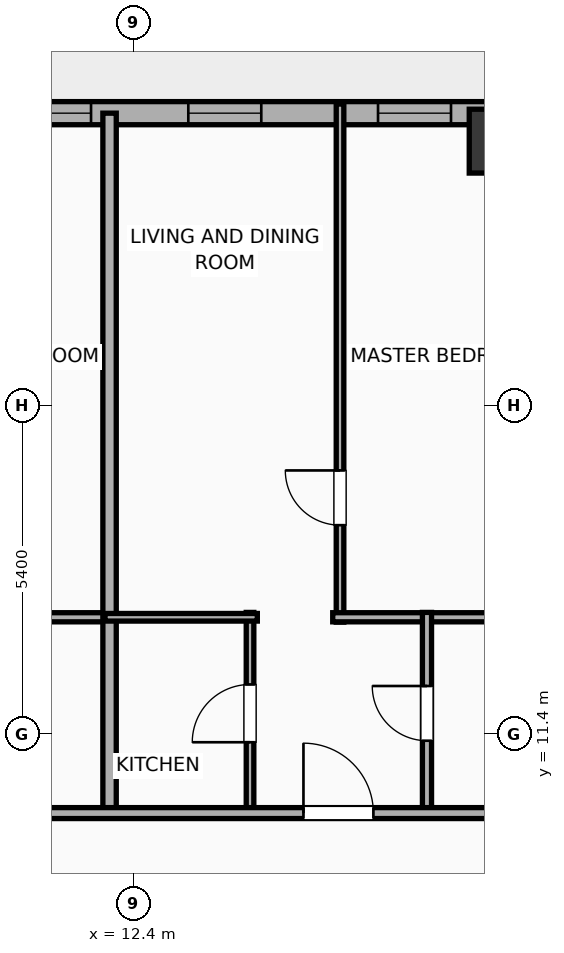
"""IFC4 building model, lengths in metres.
Left out: names, types, materials, properties, quantities, classifications, styles, units other than length and angle.
Written with IfcOpenShell. Run it as: python <this file> out.ifc"""

import sys

from ifc_helpers import new_model, si_unit, direction, frame, frame_2d, origin, origin_2d, place, context, subcontext, project, spatial, rectangle, hollow_rectangle, extrude, element, fill, save


model = new_model("IFC4")
c1 = context("Model", 3, precision=1e-05, world=origin(), true_north=direction((0.0, 1.0)))
c2 = subcontext(c1, "Body", "Model", "MODEL_VIEW")
j1 = project(units=[si_unit("LENGTHUNIT", "METRE"), si_unit("PLANEANGLEUNIT", "RADIAN")], contexts=[c1])
p1 = place(None, origin())
s1 = spatial("IfcSite", under=j1, at=p1, CompositionType="ELEMENT")
p2 = place(p1, origin())
s2 = spatial("IfcBuilding", under=s1, at=p2, CompositionType="ELEMENT")
p3 = place(p2, frame((0.0, 0.0, 113.1)))
s3 = spatial("IfcBuildingStorey", under=s2, at=p3, CompositionType="ELEMENT", Elevation=113.1)
p4 = place(p3, frame((18.44, 21.15, 0.0), z_axis=(0.0, 0.0, 1.0), x_axis=(1.0, 0.0, 0.0)))
e1 = element("IfcColumn", 1, at=p4, inside=s3, PredefinedType="COLUMN", context=c2, shape_type="SweptSolid", body=[
    extrude(hollow_rectangle(XDim=1.05, YDim=1.05, WallThickness=0.036, at=origin_2d()), origin(), (0.0, 0.0, 1.0), 3.9),
])
p5 = place(p3, frame((-25.381, 21.61, 0.0), z_axis=(0.0, 0.0, 1.0), x_axis=(1.0, 0.0, 0.0)))
e2 = element("IfcWall", 2, at=p5, inside=s3, PredefinedType="ELEMENTEDWALL", context=c2, shape_type="SweptSolid", body=[
    extrude(rectangle(XDim=54.763, YDim=0.38, at=frame_2d((27.381, 0.0))), origin(), (0.0, 0.0, 1.0), 3.65),
])
p6 = place(p5, frame((5.645, 0.0, 0.75)))
e3 = element("IfcOpeningElement", 3, at=p6, cuts=e2, PredefinedType="OPENING", context=c2, shape_type="SweptSolid", body=[
    extrude(rectangle(XDim=2.4, YDim=2.1, at=frame_2d((1.2, 1.05))), frame((0.0, 0.2, 0.0), z_axis=(0.0, -1.0, 0.0), x_axis=(1.0, 0.0, 0.0)), (0.0, 0.0, 1.0), 0.4),
])
p7 = place(p5, frame((34.677, 0.0, 0.75)))
e4 = element("IfcOpeningElement", 4, at=p7, cuts=e2, PredefinedType="OPENING", context=c2, shape_type="SweptSolid", body=[
    extrude(rectangle(XDim=2.4, YDim=2.1, at=frame_2d((1.2, 1.05))), frame((0.0, 0.2, 0.0), z_axis=(0.0, -1.0, 0.0), x_axis=(1.0, 0.0, 0.0)), (0.0, 0.0, 1.0), 0.4),
])
p8 = place(p5, frame((45.067, 0.0, 0.75)))
e5 = element("IfcOpeningElement", 5, at=p8, cuts=e2, PredefinedType="OPENING", context=c2, shape_type="SweptSolid", body=[
    extrude(rectangle(XDim=2.4, YDim=2.1, at=frame_2d((1.2, 1.05))), frame((0.0, 0.2, 0.0), z_axis=(0.0, -1.0, 0.0), x_axis=(1.0, 0.0, 0.0)), (0.0, 0.0, 1.0), 0.4),
])
p9 = place(p5, frame((2.938, 0.0, 0.75)))
e6 = element("IfcOpeningElement", 6, at=p9, cuts=e2, PredefinedType="OPENING", context=c2, shape_type="SweptSolid", body=[
    extrude(rectangle(XDim=1.2, YDim=2.05, at=frame_2d((0.6, 1.025))), frame((0.0, 0.2, 0.0), z_axis=(0.0, -1.0, 0.0), x_axis=(1.0, 0.0, 0.0)), (0.0, 0.0, 1.0), 0.4),
])
p10 = place(p5, frame((8.916, 0.0, 0.75)))
e7 = element("IfcOpeningElement", 7, at=p10, cuts=e2, PredefinedType="OPENING", context=c2, shape_type="SweptSolid", body=[
    extrude(rectangle(XDim=1.2, YDim=2.05, at=frame_2d((0.6, 1.025))), frame((0.0, 0.2, 0.0), z_axis=(0.0, -1.0, 0.0), x_axis=(1.0, 0.0, 0.0)), (0.0, 0.0, 1.0), 0.4),
])
p11 = place(p5, frame((13.476, 0.0, 0.75)))
e8 = element("IfcOpeningElement", 8, at=p11, cuts=e2, PredefinedType="OPENING", context=c2, shape_type="SweptSolid", body=[
    extrude(rectangle(XDim=1.2, YDim=2.05, at=frame_2d((0.6, 1.025))), frame((0.0, 0.2, 0.0), z_axis=(0.0, -1.0, 0.0), x_axis=(1.0, 0.0, 0.0)), (0.0, 0.0, 1.0), 0.4),
])
p12 = place(p5, frame((17.076, 0.0, 0.75)))
e9 = element("IfcOpeningElement", 9, at=p12, cuts=e2, PredefinedType="OPENING", context=c2, shape_type="SweptSolid", body=[
    extrude(rectangle(XDim=1.2, YDim=2.05, at=frame_2d((0.6, 1.025))), frame((0.0, 0.2, 0.0), z_axis=(0.0, -1.0, 0.0), x_axis=(1.0, 0.0, 0.0)), (0.0, 0.0, 1.0), 0.4),
])
p13 = place(p5, frame((19.956, 0.0, 0.75)))
e10 = element("IfcOpeningElement", 10, at=p13, cuts=e2, PredefinedType="OPENING", context=c2, shape_type="SweptSolid", body=[
    extrude(rectangle(XDim=1.2, YDim=2.05, at=frame_2d((0.6, 1.025))), frame((0.0, 0.2, 0.0), z_axis=(0.0, -1.0, 0.0), x_axis=(1.0, 0.0, 0.0)), (0.0, 0.0, 1.0), 0.4),
])
p14 = place(p5, frame((24.276, 0.0, 0.75)))
e11 = element("IfcOpeningElement", 11, at=p14, cuts=e2, PredefinedType="OPENING", context=c2, shape_type="SweptSolid", body=[
    extrude(rectangle(XDim=1.2, YDim=2.05, at=frame_2d((0.6, 1.025))), frame((0.0, 0.2, 0.0), z_axis=(0.0, -1.0, 0.0), x_axis=(1.0, 0.0, 0.0)), (0.0, 0.0, 1.0), 0.4),
])
p15 = place(p5, frame((27.876, 0.0, 0.75)))
e12 = element("IfcOpeningElement", 12, at=p15, cuts=e2, PredefinedType="OPENING", context=c2, shape_type="SweptSolid", body=[
    extrude(rectangle(XDim=1.2, YDim=2.05, at=frame_2d((0.6, 1.025))), frame((0.0, 0.2, 0.0), z_axis=(0.0, -1.0, 0.0), x_axis=(1.0, 0.0, 0.0)), (0.0, 0.0, 1.0), 0.4),
])
p16 = place(p5, frame((30.876, 0.0, 0.75)))
e13 = element("IfcOpeningElement", 13, at=p16, cuts=e2, PredefinedType="OPENING", context=c2, shape_type="SweptSolid", body=[
    extrude(rectangle(XDim=1.2, YDim=2.05, at=frame_2d((0.6, 1.025))), frame((0.0, 0.2, 0.0), z_axis=(0.0, -1.0, 0.0), x_axis=(1.0, 0.0, 0.0)), (0.0, 0.0, 1.0), 0.4),
])
p17 = place(p5, frame((38.676, 0.0, 0.75)))
e14 = element("IfcOpeningElement", 14, at=p17, cuts=e2, PredefinedType="OPENING", context=c2, shape_type="SweptSolid", body=[
    extrude(rectangle(XDim=1.2, YDim=2.05, at=frame_2d((0.6, 1.025))), frame((0.0, 0.2, 0.0), z_axis=(0.0, -1.0, 0.0), x_axis=(1.0, 0.0, 0.0)), (0.0, 0.0, 1.0), 0.4),
])
p18 = place(p5, frame((41.796, 0.0, 0.75)))
e15 = element("IfcOpeningElement", 15, at=p18, cuts=e2, PredefinedType="OPENING", context=c2, shape_type="SweptSolid", body=[
    extrude(rectangle(XDim=1.2, YDim=2.05, at=frame_2d((0.6, 1.025))), frame((0.0, 0.2, 0.0), z_axis=(0.0, -1.0, 0.0), x_axis=(1.0, 0.0, 0.0)), (0.0, 0.0, 1.0), 0.4),
])
p19 = place(p5, frame((49.476, 0.0, 0.75)))
e16 = element("IfcOpeningElement", 16, at=p19, cuts=e2, PredefinedType="OPENING", context=c2, shape_type="SweptSolid", body=[
    extrude(rectangle(XDim=1.2, YDim=2.05, at=frame_2d((0.6, 1.025))), frame((0.0, 0.2, 0.0), z_axis=(0.0, -1.0, 0.0), x_axis=(1.0, 0.0, 0.0)), (0.0, 0.0, 1.0), 0.4),
])
p20 = place(p5, frame((52.227, 0.0, 0.75)))
e17 = element("IfcOpeningElement", 17, at=p20, cuts=e2, PredefinedType="OPENING", context=c2, shape_type="SweptSolid", body=[
    extrude(rectangle(XDim=1.2, YDim=2.05, at=frame_2d((0.6, 1.025))), frame((0.0, 0.2, 0.0), z_axis=(0.0, -1.0, 0.0), x_axis=(1.0, 0.0, 0.0)), (0.0, 0.0, 1.0), 0.4),
])
p21 = place(p3, frame((8.47, 13.32, 0.0), z_axis=(0.0, 0.0, 1.0), x_axis=(1.0, 0.0, 0.0)))
e18 = element("IfcWall", 18, at=p21, inside=s3, PredefinedType="PLUMBINGWALL", context=c2, shape_type="SweptSolid", body=[
    extrude(rectangle(XDim=3.605, YDim=0.15, at=frame_2d((1.802, 0.0))), origin(), (0.0, 0.0, 1.0), 3.65),
])
p22 = place(p3, frame((12.0, 10.02, 0.0), z_axis=(0.0, 0.0, 1.0), x_axis=(0.0, 1.0, 0.0)))
e19 = element("IfcWall", 19, at=p22, inside=s3, PredefinedType="PARTITIONING", context=c2, shape_type="SweptSolid", body=[
    extrude(rectangle(XDim=11.59, YDim=0.22, at=frame_2d((5.795, 0.0))), origin(), (0.0, 0.0, 1.0), 3.65),
])
p23 = place(p3, frame((15.79, 13.24, 0.0), z_axis=(0.0, 0.0, 1.0), x_axis=(0.0, 1.0, 0.0)))
e20 = element("IfcWall", 20, at=p23, inside=s3, PredefinedType="PARTITIONING", context=c2, shape_type="SweptSolid", body=[
    extrude(rectangle(XDim=8.52, YDim=0.125, at=frame_2d((4.26, 0.0))), origin(), (0.0, 0.0, 1.0), 3.65),
])
p24 = place(p23, frame((1.595, 0.0, 0.0)))
e21 = element("IfcOpeningElement", 21, at=p24, cuts=e20, PredefinedType="OPENING", context=c2, shape_type="SweptSolid", body=[
    extrude(rectangle(XDim=0.9, YDim=2.05, at=frame_2d((0.45, 1.025))), frame((0.0, 0.073, 0.0), z_axis=(0.0, -1.0, 0.0), x_axis=(1.0, 0.0, 0.0)), (0.0, 0.0, 1.0), 0.145),
])
p25 = place(p3, frame((15.67, 13.32, 0.0), z_axis=(0.0, 0.0, 1.0), x_axis=(1.0, 0.0, 0.0)))
e22 = element("IfcWall", 22, at=p25, inside=s3, PredefinedType="PLUMBINGWALL", context=c2, shape_type="SweptSolid", body=[
    extrude(rectangle(XDim=3.605, YDim=0.15, at=frame_2d((1.802, 0.0))), origin(), (0.0, 0.0, 1.0), 3.65),
])
p26 = place(p3, frame((14.31, 10.08, 0.0), z_axis=(0.0, 0.0, 1.0), x_axis=(0.0, 1.0, 0.0)))
e23 = element("IfcWall", 23, at=p26, inside=s3, PredefinedType="PARTITIONING", context=c2, shape_type="SweptSolid", body=[
    extrude(rectangle(XDim=3.32, YDim=0.125, at=frame_2d((1.66, 0.0))), origin(), (0.0, 0.0, 1.0), 3.65),
])
p27 = place(p26, frame((1.185, 0.0, 0.0)))
e24 = element("IfcOpeningElement", 24, at=p27, cuts=e23, PredefinedType="OPENING", context=c2, shape_type="SweptSolid", body=[
    extrude(rectangle(XDim=0.95, YDim=2.05, at=frame_2d((0.475, 1.025))), frame((0.0, 0.073, 0.0), z_axis=(0.0, -1.0, 0.0), x_axis=(1.0, 0.0, 0.0)), (0.0, 0.0, 1.0), 0.145),
])
p28 = place(p3, frame((11.925, 13.32, 0.0), z_axis=(0.0, 0.0, 1.0), x_axis=(1.0, 0.0, 0.0)))
e25 = element("IfcWall", 25, at=p28, inside=s3, PredefinedType="PARTITIONING", context=c2, shape_type="SweptSolid", body=[
    extrude(rectangle(XDim=2.505, YDim=0.125, at=frame_2d((1.252, 0.0))), origin(), (0.0, 0.0, 1.0), 3.65),
])
p29 = place(p3, frame((17.22, 10.08, 0.0), z_axis=(0.0, 0.0, 1.0), x_axis=(0.0, 1.0, 0.0)))
e26 = element("IfcWall", 26, at=p29, inside=s3, PredefinedType="PLUMBINGWALL", context=c2, shape_type="SweptSolid", body=[
    extrude(rectangle(XDim=3.32, YDim=0.15, at=frame_2d((1.66, 0.0))), origin(), (0.0, 0.0, 1.0), 3.65),
])
p30 = place(p29, frame((1.21, 0.0, 0.0)))
e27 = element("IfcOpeningElement", 27, at=p30, cuts=e26, PredefinedType="OPENING", context=c2, shape_type="SweptSolid", body=[
    extrude(rectangle(XDim=0.9, YDim=2.05, at=frame_2d((0.45, 1.025))), frame((0.0, 0.085, 0.0), z_axis=(0.0, -1.0, 0.0), x_axis=(1.0, 0.0, 0.0)), (0.0, 0.0, 1.0), 0.17),
])
p31 = place(p3, frame((-29.21, 10.1, 0.0), z_axis=(0.0, 0.0, 1.0), x_axis=(1.0, 0.0, 0.0)))
e28 = element("IfcWall", 28, at=p31, inside=s3, PredefinedType="PARTITIONING", context=c2, shape_type="SweptSolid", body=[
    extrude(rectangle(XDim=62.42, YDim=0.18, at=frame_2d((31.21, 0.0))), origin(), (0.0, 0.0, 1.0), 3.65),
])
p32 = place(p31, frame((2.74, 0.0, 0.0)))
e29 = element("IfcOpeningElement", 29, at=p32, cuts=e28, PredefinedType="OPENING", context=c2, shape_type="SweptSolid", body=[
    extrude(rectangle(XDim=0.9, YDim=2.05, at=frame_2d((0.45, 1.025))), frame((0.0, 0.1, 0.0), z_axis=(0.0, -1.0, 0.0), x_axis=(1.0, 0.0, 0.0)), (0.0, 0.0, 1.0), 0.2),
])
p33 = place(p31, frame((9.868, 0.0, 0.0)))
e30 = element("IfcOpeningElement", 30, at=p33, cuts=e28, PredefinedType="OPENING", context=c2, shape_type="SweptSolid", body=[
    extrude(rectangle(XDim=1.15, YDim=2.05, at=frame_2d((0.575, 1.025))), frame((0.0, 0.1, 0.0), z_axis=(0.0, -1.0, 0.0), x_axis=(1.0, 0.0, 0.0)), (0.0, 0.0, 1.0), 0.2),
])
p34 = place(p31, frame((15.598, 0.0, 0.0)))
e31 = element("IfcOpeningElement", 31, at=p34, cuts=e28, PredefinedType="OPENING", context=c2, shape_type="SweptSolid", body=[
    extrude(rectangle(XDim=1.15, YDim=2.05, at=frame_2d((0.575, 1.025))), frame((0.0, 0.1, 0.0), z_axis=(0.0, -1.0, 0.0), x_axis=(1.0, 0.0, 0.0)), (0.0, 0.0, 1.0), 0.2),
])
p35 = place(p31, frame((22.801, 0.0, 0.0)))
e32 = element("IfcOpeningElement", 32, at=p35, cuts=e28, PredefinedType="OPENING", context=c2, shape_type="SweptSolid", body=[
    extrude(rectangle(XDim=1.15, YDim=2.05, at=frame_2d((0.575, 1.025))), frame((0.0, 0.1, 0.0), z_axis=(0.0, -1.0, 0.0), x_axis=(1.0, 0.0, 0.0)), (0.0, 0.0, 1.0), 0.2),
])
p36 = place(p31, frame((29.998, 0.0, 0.0)))
e33 = element("IfcOpeningElement", 33, at=p36, cuts=e28, PredefinedType="OPENING", context=c2, shape_type="SweptSolid", body=[
    extrude(rectangle(XDim=1.15, YDim=2.05, at=frame_2d((0.575, 1.025))), frame((0.0, 0.1, 0.0), z_axis=(0.0, -1.0, 0.0), x_axis=(1.0, 0.0, 0.0)), (0.0, 0.0, 1.0), 0.2),
])
p37 = place(p31, frame((37.202, 0.0, 0.0)))
e34 = element("IfcOpeningElement", 34, at=p37, cuts=e28, PredefinedType="OPENING", context=c2, shape_type="SweptSolid", body=[
    extrude(rectangle(XDim=1.15, YDim=2.05, at=frame_2d((0.575, 1.025))), frame((0.0, 0.1, 0.0), z_axis=(0.0, -1.0, 0.0), x_axis=(1.0, 0.0, 0.0)), (0.0, 0.0, 1.0), 0.2),
])
p38 = place(p31, frame((44.399, 0.0, 0.0)))
e35 = element("IfcOpeningElement", 35, at=p38, cuts=e28, PredefinedType="OPENING", context=c2, shape_type="SweptSolid", body=[
    extrude(rectangle(XDim=1.15, YDim=2.05, at=frame_2d((0.575, 1.025))), frame((0.0, 0.1, 0.0), z_axis=(0.0, -1.0, 0.0), x_axis=(1.0, 0.0, 0.0)), (0.0, 0.0, 1.0), 0.2),
])
p39 = place(p31, frame((51.602, 0.0, 0.0)))
e36 = element("IfcOpeningElement", 36, at=p39, cuts=e28, PredefinedType="OPENING", context=c2, shape_type="SweptSolid", body=[
    extrude(rectangle(XDim=1.15, YDim=2.05, at=frame_2d((0.575, 1.025))), frame((0.0, 0.1, 0.0), z_axis=(0.0, -1.0, 0.0), x_axis=(1.0, 0.0, 0.0)), (0.0, 0.0, 1.0), 0.2),
])
p40 = place(p31, frame((58.762, 0.0, 0.0)))
e37 = element("IfcOpeningElement", 37, at=p40, cuts=e28, PredefinedType="OPENING", context=c2, shape_type="SweptSolid", body=[
    extrude(rectangle(XDim=0.9, YDim=2.05, at=frame_2d((0.45, 1.025))), frame((0.0, 0.1, 0.0), z_axis=(0.0, -1.0, 0.0), x_axis=(1.0, 0.0, 0.0)), (0.0, 0.0, 1.0), 0.2),
])
p41 = place(p7, origin())
e38 = element("IfcWindow", 38, at=p41, inside=s3, PartitioningType="SINGLE_PANEL", PredefinedType="WINDOW", context=c2, shape_type="SweptSolid", body=[
    extrude(rectangle(XDim=2.4, YDim=2.1, at=frame_2d((1.2, 1.05))), frame((0.0, 0.03, 0.0), z_axis=(0.0, -1.0, 0.0), x_axis=(1.0, 0.0, 0.0)), (0.0, 0.0, 1.0), 0.06),
])
fill(e4, e38)
p42 = place(p17, origin())
e39 = element("IfcWindow", 39, at=p42, inside=s3, PartitioningType="SINGLE_PANEL", PredefinedType="WINDOW", context=c2, shape_type="SweptSolid", body=[
    extrude(rectangle(XDim=1.2, YDim=2.05, at=frame_2d((0.6, 1.025))), frame((0.0, 0.03, 0.0), z_axis=(0.0, -1.0, 0.0), x_axis=(1.0, 0.0, 0.0)), (0.0, 0.0, 1.0), 0.06),
])
fill(e14, e39)
p43 = place(p18, origin())
e40 = element("IfcWindow", 40, at=p43, inside=s3, PartitioningType="SINGLE_PANEL", PredefinedType="WINDOW", context=c2, shape_type="SweptSolid", body=[
    extrude(rectangle(XDim=1.2, YDim=2.05, at=frame_2d((0.6, 1.025))), frame((0.0, 0.03, 0.0), z_axis=(0.0, -1.0, 0.0), x_axis=(1.0, 0.0, 0.0)), (0.0, 0.0, 1.0), 0.06),
])
fill(e15, e40)
p44 = place(p24, origin())
e41 = element("IfcDoor", 41, at=p44, inside=s3, OperationType="SINGLE_SWING_RIGHT", PredefinedType="DOOR", context=c2, shape_type="SweptSolid", body=[
    extrude(rectangle(XDim=0.9, YDim=2.05, at=frame_2d((0.45, 1.025))), frame((0.0, 0.025, 0.0), z_axis=(0.0, -1.0, 0.0), x_axis=(1.0, 0.0, 0.0)), (0.0, 0.0, 1.0), 0.05),
])
fill(e21, e41)
p45 = place(p27, origin())
e42 = element("IfcDoor", 42, at=p45, inside=s3, OperationType="SINGLE_SWING_LEFT", PredefinedType="DOOR", context=c2, shape_type="SweptSolid", body=[
    extrude(rectangle(XDim=0.95, YDim=2.05, at=frame_2d((0.475, 1.025))), frame((0.0, 0.025, 0.0), z_axis=(0.0, -1.0, 0.0), x_axis=(1.0, 0.0, 0.0)), (0.0, 0.0, 1.0), 0.05),
])
fill(e24, e42)
p46 = place(p30, origin())
e43 = element("IfcDoor", 43, at=p46, inside=s3, OperationType="SINGLE_SWING_RIGHT", PredefinedType="DOOR", context=c2, shape_type="SweptSolid", body=[
    extrude(rectangle(XDim=0.9, YDim=2.05, at=frame_2d((0.45, 1.025))), frame((0.0, 0.025, 0.0), z_axis=(0.0, -1.0, 0.0), x_axis=(1.0, 0.0, 0.0)), (0.0, 0.0, 1.0), 0.05),
])
fill(e27, e43)
p47 = place(p38, origin())
e44 = element("IfcDoor", 44, at=p47, inside=s3, OperationType="SINGLE_SWING_LEFT", PredefinedType="DOOR", context=c2, shape_type="SweptSolid", body=[
    extrude(rectangle(XDim=1.15, YDim=2.05, at=frame_2d((0.575, 1.025))), frame((0.0, 0.025, 0.0), z_axis=(0.0, -1.0, 0.0), x_axis=(1.0, 0.0, 0.0)), (0.0, 0.0, 1.0), 0.05),
])
fill(e35, e44)
save(model, sys.argv[1])
